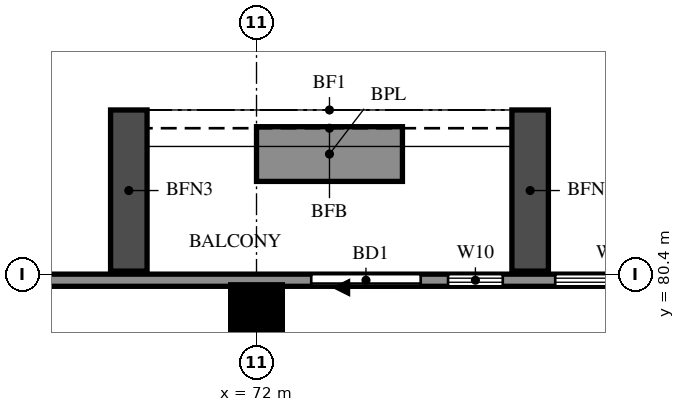
"""IFC4 building model, lengths in metres.
Left out: names, types, materials, properties, quantities, classifications, styles, units other than length and angle.
Written with IfcOpenShell. Run it as: python <this file> out.ifc"""

import sys

from ifc_helpers import new_model, si_unit, direction, frame, frame_2d, origin, origin_2d, place, context, subcontext, project, spatial, rectangle, extrude, source, transform, mapped, element, fill, save


model = new_model("IFC4")
c1 = context("Model", 3, precision=1e-05, world=origin(), true_north=direction((0.0, 1.0)))
c2 = subcontext(c1, "Body", "Model", "MODEL_VIEW")
j1 = project(units=[si_unit("LENGTHUNIT", "METRE"), si_unit("PLANEANGLEUNIT", "RADIAN")], contexts=[c1])
p1 = place(None, origin())
s1 = spatial("IfcSite", under=j1, at=p1, CompositionType="ELEMENT")
p2 = place(p1, origin())
s2 = spatial("IfcBuilding", under=s1, at=p2, CompositionType="ELEMENT")
p3 = place(p2, frame((0.0, 0.0, 164.0)))
s3 = spatial("IfcBuildingStorey", under=s2, at=p3, CompositionType="ELEMENT", Elevation=164.0)
m1 = source(origin(), c2, "Body", "SweptSolid", [
    extrude(rectangle(XDim=0.85, YDim=0.85, at=origin_2d()), origin(), (0.0, 0.0, 1.0), 3.2),
])
p4 = place(p3, frame((72.0, 79.8, 0.0), z_axis=(0.0, 0.0, 1.0), x_axis=(1.0, 0.0, 0.0)))
e1 = element("IfcColumn", 1, at=p4, inside=s3, PredefinedType="COLUMN", context=c2, shape_type="MappedRepresentation", body=[
    mapped(m1, transform((0.0, 0.0, 0.0))),
])
p5 = place(p3, frame((82.6, 80.3, 0.0), z_axis=(0.0, 0.0, 1.0), x_axis=(-1.0, 0.0, 0.0)))
e2 = element("IfcWall", 2, at=p5, inside=s3, PredefinedType="SOLIDWALL", context=c2, shape_type="SweptSolid", body=[
    extrude(rectangle(XDim=64.6, YDim=0.2, at=frame_2d((32.3, 0.0))), origin(), (0.0, 0.0, 1.0), 3.2),
])
p6 = place(p5, frame((7.9, 0.0, 0.0)))
e3 = element("IfcOpeningElement", 3, at=p6, cuts=e2, PredefinedType="OPENING", context=c2, shape_type="SweptSolid", body=[
    extrude(rectangle(XDim=1.8, YDim=2.4, at=frame_2d((0.9, 1.2))), frame((0.0, 0.11, 0.0), z_axis=(0.0, -1.0, 0.0), x_axis=(1.0, 0.0, 0.0)), (0.0, 0.0, 1.0), 0.22),
])
p7 = place(p5, frame((54.758, 0.0, 0.6)))
e4 = element("IfcOpeningElement", 4, at=p7, cuts=e2, PredefinedType="OPENING", context=c2, shape_type="SweptSolid", body=[
    extrude(rectangle(XDim=2.4, YDim=2.4, at=frame_2d((1.2, 1.2))), frame((0.0, 0.11, 0.0), z_axis=(0.0, -1.0, 0.0), x_axis=(1.0, 0.0, 0.0)), (0.0, 0.0, 1.0), 0.22),
])
p8 = place(p5, frame((57.642, 0.0, 0.6)))
e5 = element("IfcOpeningElement", 5, at=p8, cuts=e2, PredefinedType="OPENING", context=c2, shape_type="SweptSolid", body=[
    extrude(rectangle(XDim=2.4, YDim=2.4, at=frame_2d((1.2, 1.2))), frame((0.0, 0.11, 0.0), z_axis=(0.0, -1.0, 0.0), x_axis=(1.0, 0.0, 0.0)), (0.0, 0.0, 1.0), 0.22),
])
p9 = place(p5, frame((61.988, 0.0, 0.6)))
e6 = element("IfcOpeningElement", 6, at=p9, cuts=e2, PredefinedType="OPENING", context=c2, shape_type="SweptSolid", body=[
    extrude(rectangle(XDim=1.8, YDim=2.4, at=frame_2d((0.9, 1.2))), frame((0.0, 0.11, 0.0), z_axis=(0.0, -1.0, 0.0), x_axis=(1.0, 0.0, 0.0)), (0.0, 0.0, 1.0), 0.22),
])
p10 = place(p5, frame((0.712, 0.0, 0.6)))
e7 = element("IfcOpeningElement", 7, at=p10, cuts=e2, PredefinedType="OPENING", context=c2, shape_type="SweptSolid", body=[
    extrude(rectangle(XDim=1.8, YDim=2.4, at=frame_2d((0.9, 1.2))), frame((0.0, 0.11, 0.0), z_axis=(0.0, -1.0, 0.0), x_axis=(1.0, 0.0, 0.0)), (0.0, 0.0, 1.0), 0.22),
])
p11 = place(p5, frame((3.887, 0.0, 0.6)))
e8 = element("IfcOpeningElement", 8, at=p11, cuts=e2, PredefinedType="OPENING", context=c2, shape_type="SweptSolid", body=[
    extrude(rectangle(XDim=1.8, YDim=2.4, at=frame_2d((0.9, 1.2))), frame((0.0, 0.11, 0.0), z_axis=(0.0, -1.0, 0.0), x_axis=(1.0, 0.0, 0.0)), (0.0, 0.0, 1.0), 0.22),
])
p12 = place(p5, frame((6.55, 0.0, 0.6)))
e9 = element("IfcOpeningElement", 9, at=p12, cuts=e2, PredefinedType="OPENING", context=c2, shape_type="SweptSolid", body=[
    extrude(rectangle(XDim=0.9, YDim=2.4, at=frame_2d((0.45, 1.2))), frame((0.0, 0.11, 0.0), z_axis=(0.0, -1.0, 0.0), x_axis=(1.0, 0.0, 0.0)), (0.0, 0.0, 1.0), 0.22),
])
for number, where, z_axis, x_axis in (
    (10, (76.5, 80.45, 0.0), (0.0, 0.0, 1.0), (0.0, 1.0, 0.0)),
    (11, (69.9, 80.45, 0.0), (0.0, 0.0, 1.0), (0.0, 1.0, 0.0)),
):
    element("IfcWall", number, at=place(p3, frame(where, z_axis=z_axis, x_axis=x_axis)), inside=s3, PredefinedType="SOLIDWALL", context=c2, shape_type="SweptSolid", body=[
        extrude(rectangle(XDim=2.65, YDim=0.6, at=frame_2d((1.325, 0.0))), origin(), (0.0, 0.0, 1.0), 2.85),
    ])
p13 = place(p3, frame((74.4, 82.375, 0.0), z_axis=(0.0, 0.0, 1.0), x_axis=(-1.0, 0.0, 0.0)))
e12 = element("IfcWall", 12, at=p13, inside=s3, PredefinedType="SOLIDWALL", context=c2, shape_type="SweptSolid", body=[
    extrude(rectangle(XDim=2.4, YDim=0.9, at=frame_2d((1.2, 0.0))), origin(), (0.0, 0.0, 1.0), 0.9),
])
p14 = place(p6, origin())
e13 = element("IfcDoor", 13, at=p14, inside=s3, OperationType="DOUBLE_DOOR_SLIDING", PredefinedType="DOOR", context=c2, shape_type="SweptSolid", body=[
    extrude(rectangle(XDim=1.8, YDim=2.4, at=frame_2d((0.9, 1.2))), frame((0.0, 0.025, 0.0), z_axis=(0.0, -1.0, 0.0), x_axis=(1.0, 0.0, 0.0)), (0.0, 0.0, 1.0), 0.05),
])
fill(e3, e13)
p15 = place(p11, origin())
e14 = element("IfcWindow", 14, at=p15, inside=s3, PartitioningType="DOUBLE_PANEL_VERTICAL", PredefinedType="WINDOW", context=c2, shape_type="SweptSolid", body=[
    extrude(rectangle(XDim=1.8, YDim=2.4, at=frame_2d((0.9, 1.2))), frame((0.0, 0.03, 0.0), z_axis=(0.0, -1.0, 0.0), x_axis=(1.0, 0.0, 0.0)), (0.0, 0.0, 1.0), 0.06),
])
fill(e8, e14)
p16 = place(p12, origin())
e15 = element("IfcWindow", 15, at=p16, inside=s3, PartitioningType="SINGLE_PANEL", PredefinedType="WINDOW", context=c2, shape_type="SweptSolid", body=[
    extrude(rectangle(XDim=0.9, YDim=2.4, at=frame_2d((0.45, 1.2))), frame((0.0, 0.03, 0.0), z_axis=(0.0, -1.0, 0.0), x_axis=(1.0, 0.0, 0.0)), (0.0, 0.0, 1.0), 0.06),
])
fill(e9, e15)
save(model, sys.argv[1])
